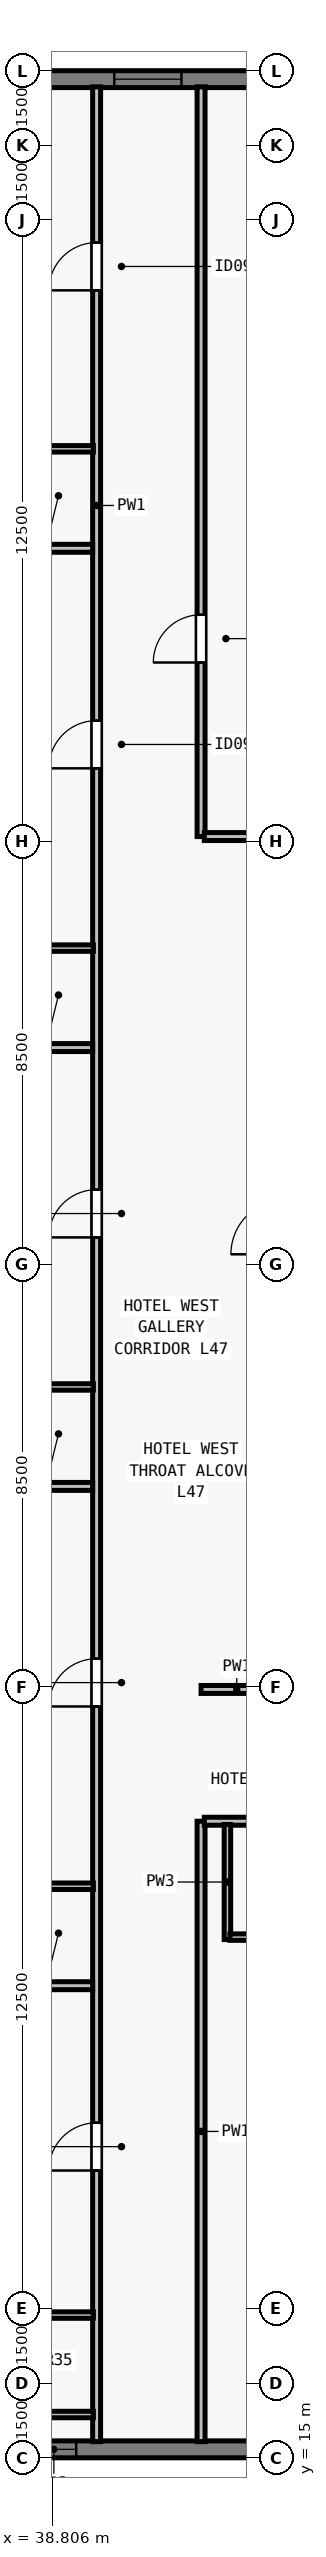
"""IFC4 building model, lengths in metres.
Left out: names, types, materials, properties, quantities, classifications, styles, units other than length and angle.
Written with IfcOpenShell. Run it as: python <this file> out.ifc"""

import sys

from ifc_helpers import new_model, si_unit, direction, frame, frame_2d, origin, place, context, subcontext, project, spatial, rectangle, extrude, element, fill, save


model = new_model("IFC4")
c1 = context("Model", 3, precision=1e-05, world=origin(), true_north=direction((0.0, 1.0)))
c2 = subcontext(c1, "Body", "Model", "MODEL_VIEW")
j1 = project(units=[si_unit("LENGTHUNIT", "METRE"), si_unit("PLANEANGLEUNIT", "RADIAN")], contexts=[c1])
p1 = place(None, origin())
s1 = spatial("IfcSite", under=j1, at=p1, CompositionType="ELEMENT")
p2 = place(p1, origin())
s2 = spatial("IfcBuilding", under=s1, at=p2, CompositionType="ELEMENT")
p3 = place(p2, frame((0.0, 0.0, 172.5)))
s3 = spatial("IfcBuildingStorey", under=s2, at=p3, CompositionType="ELEMENT", Elevation=172.5)
p4 = place(p3, frame((72.0, 15.17, 0.0), z_axis=(0.0, 0.0, 1.0), x_axis=(-1.0, 0.0, 0.0)))
e1 = element("IfcWall", 1, at=p4, inside=s3, PredefinedType="SOLIDWALL", context=c2, shape_type="SweptSolid", body=[
    extrude(rectangle(XDim=39.682, YDim=0.34, at=frame_2d((19.841, 0.0))), origin(), (0.0, 0.0, 1.0), 3.28),
])
p5 = place(p4, frame((8.505, 0.0, 0.8)))
e2 = element("IfcOpeningElement", 2, at=p5, cuts=e1, PredefinedType="OPENING", context=c2, shape_type="SweptSolid", body=[
    extrude(rectangle(XDim=1.35, YDim=1.66, at=frame_2d((0.675, 0.83))), frame((0.0, 0.18, 0.0), z_axis=(0.0, -1.0, 0.0), x_axis=(1.0, 0.0, 0.0)), (0.0, 0.0, 1.0), 0.36),
])
p6 = place(p4, frame((11.859, 0.0, 0.8)))
e3 = element("IfcOpeningElement", 3, at=p6, cuts=e1, PredefinedType="OPENING", context=c2, shape_type="SweptSolid", body=[
    extrude(rectangle(XDim=1.75, YDim=1.66, at=frame_2d((0.875, 0.83))), frame((0.0, 0.18, 0.0), z_axis=(0.0, -1.0, 0.0), x_axis=(1.0, 0.0, 0.0)), (0.0, 0.0, 1.0), 0.36),
])
p7 = place(p4, frame((16.062, 0.0, 0.8)))
e4 = element("IfcOpeningElement", 4, at=p7, cuts=e1, PredefinedType="OPENING", context=c2, shape_type="SweptSolid", body=[
    extrude(rectangle(XDim=1.35, YDim=1.66, at=frame_2d((0.675, 0.83))), frame((0.0, 0.18, 0.0), z_axis=(0.0, -1.0, 0.0), x_axis=(1.0, 0.0, 0.0)), (0.0, 0.0, 1.0), 0.36),
])
p8 = place(p4, frame((18.966, 0.0, 0.8)))
e5 = element("IfcOpeningElement", 5, at=p8, cuts=e1, PredefinedType="OPENING", context=c2, shape_type="SweptSolid", body=[
    extrude(rectangle(XDim=1.75, YDim=1.66, at=frame_2d((0.875, 0.83))), frame((0.0, 0.18, 0.0), z_axis=(0.0, -1.0, 0.0), x_axis=(1.0, 0.0, 0.0)), (0.0, 0.0, 1.0), 0.36),
])
p9 = place(p4, frame((21.469, 0.0, 0.8)))
e6 = element("IfcOpeningElement", 6, at=p9, cuts=e1, PredefinedType="OPENING", context=c2, shape_type="SweptSolid", body=[
    extrude(rectangle(XDim=1.35, YDim=1.66, at=frame_2d((0.675, 0.83))), frame((0.0, 0.18, 0.0), z_axis=(0.0, -1.0, 0.0), x_axis=(1.0, 0.0, 0.0)), (0.0, 0.0, 1.0), 0.36),
])
p10 = place(p4, frame((26.073, 0.0, 0.8)))
e7 = element("IfcOpeningElement", 7, at=p10, cuts=e1, PredefinedType="OPENING", context=c2, shape_type="SweptSolid", body=[
    extrude(rectangle(XDim=1.75, YDim=1.66, at=frame_2d((0.875, 0.83))), frame((0.0, 0.18, 0.0), z_axis=(0.0, -1.0, 0.0), x_axis=(1.0, 0.0, 0.0)), (0.0, 0.0, 1.0), 0.36),
])
p11 = place(p4, frame((32.71, 0.0, 0.8)))
e8 = element("IfcOpeningElement", 8, at=p11, cuts=e1, PredefinedType="OPENING", context=c2, shape_type="SweptSolid", body=[
    extrude(rectangle(XDim=0.9, YDim=1.66, at=frame_2d((0.45, 0.83))), frame((0.0, 0.18, 0.0), z_axis=(0.0, -1.0, 0.0), x_axis=(1.0, 0.0, 0.0)), (0.0, 0.0, 1.0), 0.36),
])
p12 = place(p3, frame((32.0, 62.83, 0.0), z_axis=(0.0, 0.0, 1.0), x_axis=(1.0, 0.0, 0.0)))
e9 = element("IfcWall", 9, at=p12, inside=s3, PredefinedType="SOLIDWALL", context=c2, shape_type="SweptSolid", body=[
    extrude(rectangle(XDim=39.682, YDim=0.34, at=frame_2d((19.841, 0.0))), origin(), (0.0, 0.0, 1.0), 3.28),
])
p13 = place(p12, frame((4.752, 0.0, 0.8)))
e10 = element("IfcOpeningElement", 10, at=p13, cuts=e9, PredefinedType="OPENING", context=c2, shape_type="SweptSolid", body=[
    extrude(rectangle(XDim=1.75, YDim=1.66, at=frame_2d((0.875, 0.83))), frame((0.0, 0.18, 0.0), z_axis=(0.0, -1.0, 0.0), x_axis=(1.0, 0.0, 0.0)), (0.0, 0.0, 1.0), 0.36),
])
p14 = place(p12, frame((8.055, 0.0, 0.8)))
e11 = element("IfcOpeningElement", 11, at=p14, cuts=e9, PredefinedType="OPENING", context=c2, shape_type="SweptSolid", body=[
    extrude(rectangle(XDim=1.35, YDim=1.66, at=frame_2d((0.675, 0.83))), frame((0.0, 0.18, 0.0), z_axis=(0.0, -1.0, 0.0), x_axis=(1.0, 0.0, 0.0)), (0.0, 0.0, 1.0), 0.36),
])
p15 = place(p12, frame((11.859, 0.0, 0.8)))
e12 = element("IfcOpeningElement", 12, at=p15, cuts=e9, PredefinedType="OPENING", context=c2, shape_type="SweptSolid", body=[
    extrude(rectangle(XDim=1.75, YDim=1.66, at=frame_2d((0.875, 0.83))), frame((0.0, 0.18, 0.0), z_axis=(0.0, -1.0, 0.0), x_axis=(1.0, 0.0, 0.0)), (0.0, 0.0, 1.0), 0.36),
])
p16 = place(p12, frame((18.966, 0.0, 0.8)))
e13 = element("IfcOpeningElement", 13, at=p16, cuts=e9, PredefinedType="OPENING", context=c2, shape_type="SweptSolid", body=[
    extrude(rectangle(XDim=1.75, YDim=1.66, at=frame_2d((0.875, 0.83))), frame((0.0, 0.18, 0.0), z_axis=(0.0, -1.0, 0.0), x_axis=(1.0, 0.0, 0.0)), (0.0, 0.0, 1.0), 0.36),
])
p17 = place(p12, frame((21.469, 0.0, 0.8)))
e14 = element("IfcOpeningElement", 14, at=p17, cuts=e9, PredefinedType="OPENING", context=c2, shape_type="SweptSolid", body=[
    extrude(rectangle(XDim=1.35, YDim=1.66, at=frame_2d((0.675, 0.83))), frame((0.0, 0.18, 0.0), z_axis=(0.0, -1.0, 0.0), x_axis=(1.0, 0.0, 0.0)), (0.0, 0.0, 1.0), 0.36),
])
p18 = place(p12, frame((26.073, 0.0, 0.8)))
e15 = element("IfcOpeningElement", 15, at=p18, cuts=e9, PredefinedType="OPENING", context=c2, shape_type="SweptSolid", body=[
    extrude(rectangle(XDim=1.75, YDim=1.66, at=frame_2d((0.875, 0.83))), frame((0.0, 0.18, 0.0), z_axis=(0.0, -1.0, 0.0), x_axis=(1.0, 0.0, 0.0)), (0.0, 0.0, 1.0), 0.36),
])
p19 = place(p12, frame((29.827, 0.0, 0.8)))
e16 = element("IfcOpeningElement", 16, at=p19, cuts=e9, PredefinedType="OPENING", context=c2, shape_type="SweptSolid", body=[
    extrude(rectangle(XDim=1.35, YDim=1.66, at=frame_2d((0.675, 0.83))), frame((0.0, 0.18, 0.0), z_axis=(0.0, -1.0, 0.0), x_axis=(1.0, 0.0, 0.0)), (0.0, 0.0, 1.0), 0.36),
])
p20 = place(p12, frame((34.47, 0.0, 0.8)))
e17 = element("IfcOpeningElement", 17, at=p20, cuts=e9, PredefinedType="OPENING", context=c2, shape_type="SweptSolid", body=[
    extrude(rectangle(XDim=0.9, YDim=1.66, at=frame_2d((0.45, 0.83))), frame((0.0, 0.18, 0.0), z_axis=(0.0, -1.0, 0.0), x_axis=(1.0, 0.0, 0.0)), (0.0, 0.0, 1.0), 0.36),
])
p21 = place(p3, frame((39.7, 15.325, 0.0), z_axis=(0.0, 0.0, 1.0), x_axis=(0.0, 1.0, 0.0)))
e18 = element("IfcWall", 18, at=p21, inside=s3, PredefinedType="PARTITIONING", context=c2, shape_type="SweptSolid", body=[
    extrude(rectangle(XDim=47.35, YDim=0.16, at=frame_2d((23.675, 0.0))), origin(), (0.0, 0.0, 1.0), 2.555),
])
p22 = place(p21, frame((5.451, 0.0, 0.0)))
e19 = element("IfcOpeningElement", 19, at=p22, cuts=e18, PredefinedType="OPENING", context=c2, shape_type="SweptSolid", body=[
    extrude(rectangle(XDim=0.96, YDim=2.15, at=frame_2d((0.48, 1.075))), frame((0.0, 0.09, 0.0), z_axis=(0.0, -1.0, 0.0), x_axis=(1.0, 0.0, 0.0)), (0.0, 0.0, 1.0), 0.18),
])
p23 = place(p21, frame((14.783, 0.0, 0.0)))
e20 = element("IfcOpeningElement", 20, at=p23, cuts=e18, PredefinedType="OPENING", context=c2, shape_type="SweptSolid", body=[
    extrude(rectangle(XDim=0.96, YDim=2.15, at=frame_2d((0.48, 1.075))), frame((0.0, 0.09, 0.0), z_axis=(0.0, -1.0, 0.0), x_axis=(1.0, 0.0, 0.0)), (0.0, 0.0, 1.0), 0.18),
])
p24 = place(p21, frame((24.215, 0.0, 0.0)))
e21 = element("IfcOpeningElement", 21, at=p24, cuts=e18, PredefinedType="OPENING", context=c2, shape_type="SweptSolid", body=[
    extrude(rectangle(XDim=0.96, YDim=2.15, at=frame_2d((0.48, 1.075))), frame((0.0, 0.09, 0.0), z_axis=(0.0, -1.0, 0.0), x_axis=(1.0, 0.0, 0.0)), (0.0, 0.0, 1.0), 0.18),
])
p25 = place(p21, frame((33.647, 0.0, 0.0)))
e22 = element("IfcOpeningElement", 22, at=p25, cuts=e18, PredefinedType="OPENING", context=c2, shape_type="SweptSolid", body=[
    extrude(rectangle(XDim=0.96, YDim=2.15, at=frame_2d((0.48, 1.075))), frame((0.0, 0.09, 0.0), z_axis=(0.0, -1.0, 0.0), x_axis=(1.0, 0.0, 0.0)), (0.0, 0.0, 1.0), 0.18),
])
p26 = place(p21, frame((43.258, 0.0, 0.0)))
e23 = element("IfcOpeningElement", 23, at=p26, cuts=e18, PredefinedType="OPENING", context=c2, shape_type="SweptSolid", body=[
    extrude(rectangle(XDim=0.96, YDim=2.15, at=frame_2d((0.48, 1.075))), frame((0.0, 0.09, 0.0), z_axis=(0.0, -1.0, 0.0), x_axis=(1.0, 0.0, 0.0)), (0.0, 0.0, 1.0), 0.18),
])
p27 = place(p3, frame((41.8, 15.325, 0.0), z_axis=(0.0, 0.0, 1.0), x_axis=(0.0, 1.0, 0.0)))
e24 = element("IfcWall", 24, at=p27, inside=s3, PredefinedType="PARTITIONING", context=c2, shape_type="SweptSolid", body=[
    extrude(rectangle(XDim=12.475, YDim=0.16, at=frame_2d((6.238, 0.0))), origin(), (0.0, 0.0, 1.0), 3.28),
])
p28 = place(p3, frame((41.8, 47.6, 0.0), z_axis=(0.0, 0.0, 1.0), x_axis=(0.0, 1.0, 0.0)))
e25 = element("IfcWall", 25, at=p28, inside=s3, PredefinedType="PARTITIONING", context=c2, shape_type="SweptSolid", body=[
    extrude(rectangle(XDim=15.075, YDim=0.16, at=frame_2d((7.538, 0.0))), origin(), (0.0, 0.0, 1.0), 2.555),
])
p29 = place(p28, frame((3.5, 0.0, 0.0)))
e26 = element("IfcOpeningElement", 26, at=p29, cuts=e25, PredefinedType="OPENING", context=c2, shape_type="SweptSolid", body=[
    extrude(rectangle(XDim=0.96, YDim=2.12, at=frame_2d((0.48, 1.06))), frame((0.0, 0.09, 0.0), z_axis=(0.0, -1.0, 0.0), x_axis=(1.0, 0.0, 0.0)), (0.0, 0.0, 1.0), 0.18),
])
p30 = place(p3, frame((41.8, 30.45, 0.0), z_axis=(0.0, 0.0, 1.0), x_axis=(1.0, 0.0, 0.0)))
e27 = element("IfcWall", 27, at=p30, inside=s3, PredefinedType="PARTITIONING", context=c2, shape_type="SweptSolid", body=[
    extrude(rectangle(XDim=1.435, YDim=0.16, at=frame_2d((0.718, 0.0))), origin(), (0.0, 0.0, 1.0), 3.28),
])
p31 = place(p3, frame((41.865, 47.6, 0.0), z_axis=(0.0, 0.0, 1.0), x_axis=(1.0, 0.0, 0.0)))
e28 = element("IfcWall", 28, at=p31, inside=s3, PredefinedType="PARTITIONING", context=c2, shape_type="SweptSolid", body=[
    extrude(rectangle(XDim=1.37, YDim=0.16, at=frame_2d((0.685, 0.0))), origin(), (0.0, 0.0, 1.0), 3.28),
])
p32 = place(p3, frame((41.865, 27.8, 0.0), z_axis=(0.0, 0.0, 1.0), x_axis=(1.0, 0.0, 0.0)))
e29 = element("IfcWall", 29, at=p32, inside=s3, PredefinedType="PARTITIONING", context=c2, shape_type="SweptSolid", body=[
    extrude(rectangle(XDim=22.07, YDim=0.16, at=frame_2d((11.035, 0.0))), origin(), (0.0, 0.0, 1.0), 3.28),
])
p33 = place(p32, frame((4.232, 0.0, 0.0)))
e30 = element("IfcOpeningElement", 30, at=p33, cuts=e29, PredefinedType="OPENING", context=c2, shape_type="SweptSolid", body=[
    extrude(rectangle(XDim=0.96, YDim=2.15, at=frame_2d((0.48, 1.075))), frame((0.0, 0.09, 0.0), z_axis=(0.0, -1.0, 0.0), x_axis=(1.0, 0.0, 0.0)), (0.0, 0.0, 1.0), 0.18),
])
p34 = place(p32, frame((11.545, 0.0, 0.0)))
e31 = element("IfcOpeningElement", 31, at=p34, cuts=e29, PredefinedType="OPENING", context=c2, shape_type="SweptSolid", body=[
    extrude(rectangle(XDim=0.96, YDim=2.15, at=frame_2d((0.48, 1.075))), frame((0.0, 0.09, 0.0), z_axis=(0.0, -1.0, 0.0), x_axis=(1.0, 0.0, 0.0)), (0.0, 0.0, 1.0), 0.18),
])
p35 = place(p32, frame((19.168, 0.0, 0.0)))
e32 = element("IfcOpeningElement", 32, at=p35, cuts=e29, PredefinedType="OPENING", context=c2, shape_type="SweptSolid", body=[
    extrude(rectangle(XDim=0.96, YDim=2.15, at=frame_2d((0.48, 1.075))), frame((0.0, 0.09, 0.0), z_axis=(0.0, -1.0, 0.0), x_axis=(1.0, 0.0, 0.0)), (0.0, 0.0, 1.0), 0.18),
])
p36 = place(p3, frame((42.33, 25.42, 0.0), z_axis=(0.0, 0.0, 1.0), x_axis=(0.0, 1.0, 0.0)))
e33 = element("IfcWall", 33, at=p36, inside=s3, PredefinedType="PLUMBINGWALL", context=c2, shape_type="SweptSolid", body=[
    extrude(rectangle(XDim=2.315, YDim=0.13, at=frame_2d((1.158, 0.0))), origin(), (0.0, 0.0, 1.0), 3.28),
])
p37 = place(p3, frame((42.38, 25.47, 0.0), z_axis=(0.0, 0.0, 1.0), x_axis=(1.0, 0.0, 0.0)))
e34 = element("IfcWall", 34, at=p37, inside=s3, PredefinedType="PLUMBINGWALL", context=c2, shape_type="SweptSolid", body=[
    extrude(rectangle(XDim=1.9, YDim=0.13, at=frame_2d((0.95, 0.0))), origin(), (0.0, 0.0, 1.0), 3.28),
])
p38 = place(p37, frame((0.54, 0.0, 0.0)))
e35 = element("IfcOpeningElement", 35, at=p38, cuts=e34, PredefinedType="OPENING", context=c2, shape_type="SweptSolid", body=[
    extrude(rectangle(XDim=0.82, YDim=2.1, at=frame_2d((0.41, 1.05))), frame((0.0, 0.075, 0.0), z_axis=(0.0, -1.0, 0.0), x_axis=(1.0, 0.0, 0.0)), (0.0, 0.0, 1.0), 0.15),
])
for number, where, z_axis, x_axis in (
    (36, (37.32, 15.87, 0.0), (0.0, 0.0, 1.0), (1.0, 0.0, 0.0)),
    (37, (37.32, 17.87, 0.0), (0.0, 0.0, 1.0), (1.0, 0.0, 0.0)),
):
    element("IfcWall", number, at=place(p3, frame(where, z_axis=z_axis, x_axis=x_axis)), inside=s3, PredefinedType="PLUMBINGWALL", context=c2, shape_type="SweptSolid", body=[
        extrude(rectangle(XDim=2.315, YDim=0.13, at=frame_2d((1.157, 0.0))), origin(), (0.0, 0.0, 1.0), 3.28),
    ])
p39 = place(p3, frame((28.325, 24.493, 0.0), z_axis=(0.0, 0.0, 1.0), x_axis=(1.0, 0.0, 0.0)))
e38 = element("IfcWall", 38, at=p39, inside=s3, PredefinedType="PARTITIONING", context=c2, shape_type="SweptSolid", body=[
    extrude(rectangle(XDim=11.295, YDim=0.16, at=frame_2d((5.647, 0.0))), origin(), (0.0, 0.0, 1.0), 2.896),
])
p40 = place(p3, frame((37.32, 26.493, 0.0), z_axis=(0.0, 0.0, 1.0), x_axis=(1.0, 0.0, 0.0)))
e39 = element("IfcWall", 39, at=p40, inside=s3, PredefinedType="PLUMBINGWALL", context=c2, shape_type="SweptSolid", body=[
    extrude(rectangle(XDim=2.315, YDim=0.13, at=frame_2d((1.157, 0.0))), origin(), (0.0, 0.0, 1.0), 2.896),
])
p41 = place(p3, frame((28.325, 34.533, 0.0), z_axis=(0.0, 0.0, 1.0), x_axis=(1.0, 0.0, 0.0)))
e40 = element("IfcWall", 40, at=p41, inside=s3, PredefinedType="PARTITIONING", context=c2, shape_type="SweptSolid", body=[
    extrude(rectangle(XDim=11.295, YDim=0.16, at=frame_2d((5.647, 0.0))), origin(), (0.0, 0.0, 1.0), 2.896),
])
p42 = place(p3, frame((37.32, 36.533, 0.0), z_axis=(0.0, 0.0, 1.0), x_axis=(1.0, 0.0, 0.0)))
e41 = element("IfcWall", 41, at=p42, inside=s3, PredefinedType="PLUMBINGWALL", context=c2, shape_type="SweptSolid", body=[
    extrude(rectangle(XDim=2.315, YDim=0.13, at=frame_2d((1.157, 0.0))), origin(), (0.0, 0.0, 1.0), 3.28),
])
p43 = place(p3, frame((28.325, 43.357, 0.0), z_axis=(0.0, 0.0, 1.0), x_axis=(1.0, 0.0, 0.0)))
e42 = element("IfcWall", 42, at=p43, inside=s3, PredefinedType="PARTITIONING", context=c2, shape_type="SweptSolid", body=[
    extrude(rectangle(XDim=11.295, YDim=0.16, at=frame_2d((5.647, 0.0))), origin(), (0.0, 0.0, 1.0), 2.896),
])
p44 = place(p3, frame((37.32, 45.357, 0.0), z_axis=(0.0, 0.0, 1.0), x_axis=(1.0, 0.0, 0.0)))
e43 = element("IfcWall", 43, at=p44, inside=s3, PredefinedType="PLUMBINGWALL", context=c2, shape_type="SweptSolid", body=[
    extrude(rectangle(XDim=2.315, YDim=0.13, at=frame_2d((1.157, 0.0))), origin(), (0.0, 0.0, 1.0), 3.28),
])
p45 = place(p3, frame((28.325, 53.396, 0.0), z_axis=(0.0, 0.0, 1.0), x_axis=(1.0, 0.0, 0.0)))
e44 = element("IfcWall", 44, at=p45, inside=s3, PredefinedType="PARTITIONING", context=c2, shape_type="SweptSolid", body=[
    extrude(rectangle(XDim=11.295, YDim=0.16, at=frame_2d((5.647, 0.0))), origin(), (0.0, 0.0, 1.0), 2.896),
])
p46 = place(p3, frame((37.32, 55.396, 0.0), z_axis=(0.0, 0.0, 1.0), x_axis=(1.0, 0.0, 0.0)))
e45 = element("IfcWall", 45, at=p46, inside=s3, PredefinedType="PLUMBINGWALL", context=c2, shape_type="SweptSolid", body=[
    extrude(rectangle(XDim=2.315, YDim=0.13, at=frame_2d((1.157, 0.0))), origin(), (0.0, 0.0, 1.0), 3.28),
])
p47 = place(p14, origin())
e46 = element("IfcWindow", 46, at=p47, inside=s3, PartitioningType="SINGLE_PANEL", PredefinedType="WINDOW", context=c2, shape_type="SweptSolid", body=[
    extrude(rectangle(XDim=1.35, YDim=1.66, at=frame_2d((0.675, 0.83))), frame((0.0, -0.05, 0.0), z_axis=(0.0, -1.0, 0.0), x_axis=(1.0, 0.0, 0.0)), (0.0, 0.0, 1.0), 0.06),
])
fill(e11, e46)
p48 = place(p11, origin())
e47 = element("IfcWindow", 47, at=p48, inside=s3, PartitioningType="SINGLE_PANEL", PredefinedType="WINDOW", context=c2, shape_type="SweptSolid", body=[
    extrude(rectangle(XDim=0.9, YDim=1.66, at=frame_2d((0.45, 0.83))), frame((0.0, -0.04, 0.0), z_axis=(0.0, -1.0, 0.0), x_axis=(1.0, 0.0, 0.0)), (0.0, 0.0, 1.0), 0.06),
])
fill(e8, e47)
p49 = place(p29, origin())
e48 = element("IfcDoor", 48, at=p49, inside=s3, OperationType="SINGLE_SWING_LEFT", PredefinedType="DOOR", context=c2, shape_type="SweptSolid", body=[
    extrude(rectangle(XDim=0.96, YDim=2.12, at=frame_2d((0.48, 1.06))), frame((0.0, 0.025, 0.0), z_axis=(0.0, -1.0, 0.0), x_axis=(1.0, 0.0, 0.0)), (0.0, 0.0, 1.0), 0.05),
])
fill(e26, e48)
p50 = place(p22, origin())
e49 = element("IfcDoor", 49, at=p50, inside=s3, OperationType="SINGLE_SWING_LEFT", PredefinedType="DOOR", context=c2, shape_type="SweptSolid", body=[
    extrude(rectangle(XDim=0.96, YDim=2.15, at=frame_2d((0.48, 1.075))), frame((0.0, 0.025, 0.0), z_axis=(0.0, -1.0, 0.0), x_axis=(1.0, 0.0, 0.0)), (0.0, 0.0, 1.0), 0.05),
])
fill(e19, e49)
p51 = place(p23, origin())
e50 = element("IfcDoor", 50, at=p51, inside=s3, OperationType="SINGLE_SWING_LEFT", PredefinedType="DOOR", context=c2, shape_type="SweptSolid", body=[
    extrude(rectangle(XDim=0.96, YDim=2.15, at=frame_2d((0.48, 1.075))), frame((0.0, 0.025, 0.0), z_axis=(0.0, -1.0, 0.0), x_axis=(1.0, 0.0, 0.0)), (0.0, 0.0, 1.0), 0.05),
])
fill(e20, e50)
p52 = place(p24, origin())
e51 = element("IfcDoor", 51, at=p52, inside=s3, OperationType="SINGLE_SWING_LEFT", PredefinedType="DOOR", context=c2, shape_type="SweptSolid", body=[
    extrude(rectangle(XDim=0.96, YDim=2.15, at=frame_2d((0.48, 1.075))), frame((0.0, 0.025, 0.0), z_axis=(0.0, -1.0, 0.0), x_axis=(1.0, 0.0, 0.0)), (0.0, 0.0, 1.0), 0.05),
])
fill(e21, e51)
p53 = place(p25, origin())
e52 = element("IfcDoor", 52, at=p53, inside=s3, OperationType="SINGLE_SWING_LEFT", PredefinedType="DOOR", context=c2, shape_type="SweptSolid", body=[
    extrude(rectangle(XDim=0.96, YDim=2.15, at=frame_2d((0.48, 1.075))), frame((0.0, 0.025, 0.0), z_axis=(0.0, -1.0, 0.0), x_axis=(1.0, 0.0, 0.0)), (0.0, 0.0, 1.0), 0.05),
])
fill(e22, e52)
p54 = place(p26, origin())
e53 = element("IfcDoor", 53, at=p54, inside=s3, OperationType="SINGLE_SWING_LEFT", PredefinedType="DOOR", context=c2, shape_type="SweptSolid", body=[
    extrude(rectangle(XDim=0.96, YDim=2.15, at=frame_2d((0.48, 1.075))), frame((0.0, 0.025, 0.0), z_axis=(0.0, -1.0, 0.0), x_axis=(1.0, 0.0, 0.0)), (0.0, 0.0, 1.0), 0.05),
])
fill(e23, e53)
save(model, sys.argv[1])
